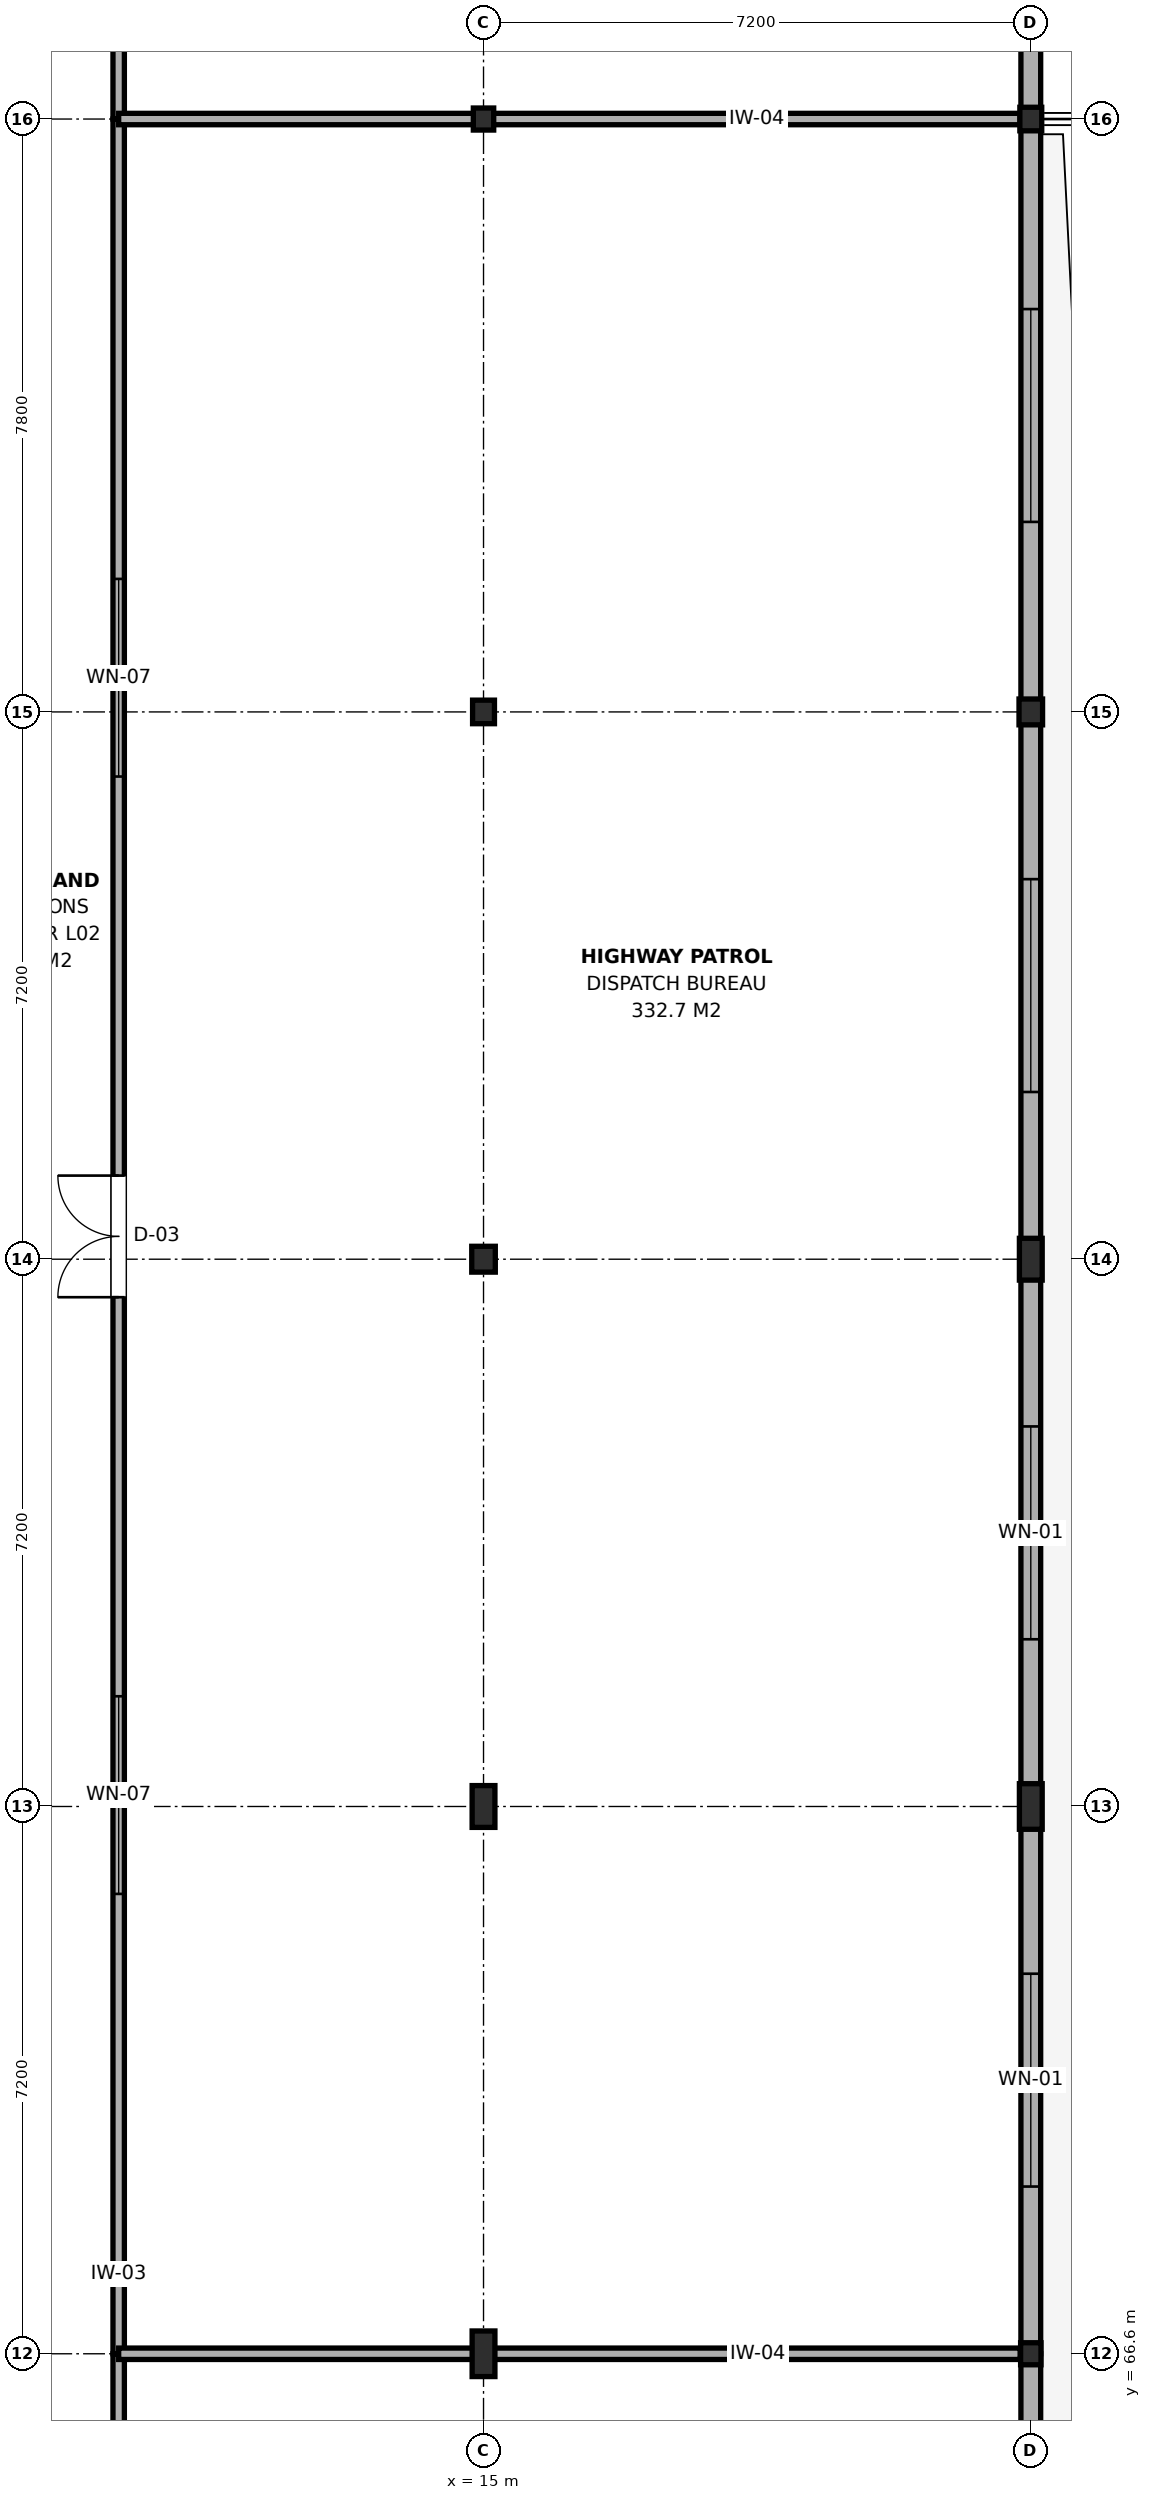
"""IFC4 building model, lengths in metres.
Left out: names, types, materials, properties, quantities, classifications, styles, units other than length and angle.
Written with IfcOpenShell. Run it as: python <this file> out.ifc"""

import sys

from ifc_helpers import new_model, si_unit, direction, frame, frame_2d, origin, origin_2d, place, context, subcontext, project, spatial, rectangle, i_section, extrude, element, fill, save


model = new_model("IFC4")
c1 = context("Model", 3, precision=1e-05, world=origin(), true_north=direction((0.0, 1.0)))
c2 = subcontext(c1, "Body", "Model", "MODEL_VIEW")
j1 = project(units=[si_unit("LENGTHUNIT", "METRE"), si_unit("PLANEANGLEUNIT", "RADIAN")], contexts=[c1])
p1 = place(None, origin())
s1 = spatial("IfcSite", under=j1, at=p1, CompositionType="ELEMENT")
p2 = place(p1, origin())
s2 = spatial("IfcBuilding", under=s1, at=p2, CompositionType="ELEMENT")
p3 = place(p2, frame((0.0, 0.0, 9.0)))
s3 = spatial("IfcBuildingStorey", under=s2, at=p3, CompositionType="ELEMENT", Elevation=9.0)
p4 = place(p3, frame((15.0, 66.6, 0.0), z_axis=(0.0, 0.0, 1.0), x_axis=(1.0, 0.0, 0.0)))
e1 = element("IfcColumn", 1, at=p4, inside=s3, PredefinedType="COLUMN", context=c2, shape_type="SweptSolid", body=[
    extrude(i_section(OverallWidth=0.3, OverallDepth=0.6, WebThickness=0.015, FlangeThickness=0.03, FilletRadius=0.027, at=origin_2d()), origin(), (0.0, 0.0, 1.0), 4.2),
])
p5 = place(p3, frame((15.0, 73.8, 0.0), z_axis=(0.0, 0.0, 1.0), x_axis=(1.0, 0.0, 0.0)))
e2 = element("IfcColumn", 2, at=p5, inside=s3, PredefinedType="COLUMN", context=c2, shape_type="SweptSolid", body=[
    extrude(i_section(OverallWidth=0.3, OverallDepth=0.55, WebThickness=0.015, FlangeThickness=0.029, FilletRadius=0.027, at=origin_2d()), origin(), (0.0, 0.0, 1.0), 4.2),
])
p6 = place(p3, frame((15.0, 81.0, 0.0), z_axis=(0.0, 0.0, 1.0), x_axis=(1.0, 0.0, 0.0)))
e3 = element("IfcColumn", 3, at=p6, inside=s3, PredefinedType="COLUMN", context=c2, shape_type="SweptSolid", body=[
    extrude(i_section(OverallWidth=0.31, OverallDepth=0.34, WebThickness=0.021, FlangeThickness=0.039, FilletRadius=0.027, at=origin_2d()), origin(), (0.0, 0.0, 1.0), 4.2),
])
p7 = place(p3, frame((15.0, 88.2, 0.0), z_axis=(0.0, 0.0, 1.0), x_axis=(1.0, 0.0, 0.0)))
e4 = element("IfcColumn", 4, at=p7, inside=s3, PredefinedType="COLUMN", context=c2, shape_type="SweptSolid", body=[
    extrude(i_section(OverallWidth=0.288, OverallDepth=0.31, WebThickness=0.019, FlangeThickness=0.033, FilletRadius=0.024, at=origin_2d()), origin(), (0.0, 0.0, 1.0), 4.2),
])
for number, where, z_axis, x_axis in (
    (5, (15.0, 96.0, 0.0), (0.0, 0.0, 1.0), (1.0, 0.0, 0.0)),
    (6, (22.2, 66.6, 0.0), (0.0, 0.0, 1.0), (1.0, 0.0, 0.0)),
):
    element("IfcColumn", number, at=place(p3, frame(where, z_axis=z_axis, x_axis=x_axis)), inside=s3, PredefinedType="COLUMN", context=c2, shape_type="SweptSolid", body=[
        extrude(i_section(OverallWidth=0.268, OverallDepth=0.29, WebThickness=0.018, FlangeThickness=0.032, FilletRadius=0.024, at=origin_2d()), origin(), (0.0, 0.0, 1.0), 4.2),
    ])
p8 = place(p3, frame((22.2, 73.8, 0.0), z_axis=(0.0, 0.0, 1.0), x_axis=(1.0, 0.0, 0.0)))
e7 = element("IfcColumn", 7, at=p8, inside=s3, PredefinedType="COLUMN", context=c2, shape_type="SweptSolid", body=[
    extrude(i_section(OverallWidth=0.3, OverallDepth=0.6, WebThickness=0.015, FlangeThickness=0.03, FilletRadius=0.027, at=origin_2d()), origin(), (0.0, 0.0, 1.0), 4.2),
])
p9 = place(p3, frame((22.2, 81.0, 0.0), z_axis=(0.0, 0.0, 1.0), x_axis=(1.0, 0.0, 0.0)))
e8 = element("IfcColumn", 8, at=p9, inside=s3, PredefinedType="COLUMN", context=c2, shape_type="SweptSolid", body=[
    extrude(i_section(OverallWidth=0.3, OverallDepth=0.55, WebThickness=0.015, FlangeThickness=0.029, FilletRadius=0.027, at=origin_2d()), origin(), (0.0, 0.0, 1.0), 4.2),
])
p10 = place(p3, frame((22.2, 88.2, 0.0), z_axis=(0.0, 0.0, 1.0), x_axis=(1.0, 0.0, 0.0)))
e9 = element("IfcColumn", 9, at=p10, inside=s3, PredefinedType="COLUMN", context=c2, shape_type="SweptSolid", body=[
    extrude(i_section(OverallWidth=0.31, OverallDepth=0.34, WebThickness=0.021, FlangeThickness=0.039, FilletRadius=0.027, at=origin_2d()), origin(), (0.0, 0.0, 1.0), 4.2),
])
p11 = place(p3, frame((22.2, 96.0, 0.0), z_axis=(0.0, 0.0, 1.0), x_axis=(1.0, 0.0, 0.0)))
e10 = element("IfcColumn", 10, at=p11, inside=s3, PredefinedType="COLUMN", context=c2, shape_type="SweptSolid", body=[
    extrude(i_section(OverallWidth=0.288, OverallDepth=0.31, WebThickness=0.019, FlangeThickness=0.033, FilletRadius=0.024, at=origin_2d()), origin(), (0.0, 0.0, 1.0), 4.2),
])
p12 = place(p3, frame((22.2, 58.8, 0.0), z_axis=(0.0, 0.0, 1.0), x_axis=(0.0, 1.0, 0.0)))
e11 = element("IfcWall", 11, at=p12, inside=s3, PredefinedType="SOLIDWALL", context=c2, shape_type="SweptSolid", body=[
    extrude(rectangle(XDim=7.8, YDim=0.26, at=frame_2d((3.9, 0.0))), origin(), (0.0, 0.0, 1.0), 3.525),
])
p13 = place(p12, frame((2.5, 0.0, 0.9)))
e12 = element("IfcOpeningElement", 12, at=p13, cuts=e11, PredefinedType="OPENING", context=c2, shape_type="SweptSolid", body=[
    extrude(rectangle(XDim=2.8, YDim=2.2, at=frame_2d((1.4, 1.1))), frame((0.0, 0.145, 0.0), z_axis=(0.0, -1.0, 0.0), x_axis=(1.0, 0.0, 0.0)), (0.0, 0.0, 1.0), 0.29),
])
p14 = place(p3, frame((22.2, 66.6, 0.0), z_axis=(0.0, 0.0, 1.0), x_axis=(0.0, 1.0, 0.0)))
e13 = element("IfcWall", 13, at=p14, inside=s3, PredefinedType="SOLIDWALL", context=c2, shape_type="SweptSolid", body=[
    extrude(rectangle(XDim=7.2, YDim=0.26, at=frame_2d((3.6, 0.0))), origin(), (0.0, 0.0, 1.0), 3.625),
])
p15 = place(p14, frame((2.2, 0.0, 0.9)))
e14 = element("IfcOpeningElement", 14, at=p15, cuts=e13, PredefinedType="OPENING", context=c2, shape_type="SweptSolid", body=[
    extrude(rectangle(XDim=2.8, YDim=2.2, at=frame_2d((1.4, 1.1))), frame((0.0, 0.145, 0.0), z_axis=(0.0, -1.0, 0.0), x_axis=(1.0, 0.0, 0.0)), (0.0, 0.0, 1.0), 0.29),
])
p16 = place(p3, frame((22.2, 73.8, 0.0), z_axis=(0.0, 0.0, 1.0), x_axis=(0.0, 1.0, 0.0)))
e15 = element("IfcWall", 15, at=p16, inside=s3, PredefinedType="SOLIDWALL", context=c2, shape_type="SweptSolid", body=[
    extrude(rectangle(XDim=7.2, YDim=0.26, at=frame_2d((3.6, 0.0))), origin(), (0.0, 0.0, 1.0), 3.375),
])
p17 = place(p16, frame((2.2, 0.0, 0.9)))
e16 = element("IfcOpeningElement", 16, at=p17, cuts=e15, PredefinedType="OPENING", context=c2, shape_type="SweptSolid", body=[
    extrude(rectangle(XDim=2.8, YDim=2.2, at=frame_2d((1.4, 1.1))), frame((0.0, 0.145, 0.0), z_axis=(0.0, -1.0, 0.0), x_axis=(1.0, 0.0, 0.0)), (0.0, 0.0, 1.0), 0.29),
])
p18 = place(p3, frame((22.2, 81.0, 0.0), z_axis=(0.0, 0.0, 1.0), x_axis=(0.0, 1.0, 0.0)))
e17 = element("IfcWall", 17, at=p18, inside=s3, PredefinedType="SOLIDWALL", context=c2, shape_type="SweptSolid", body=[
    extrude(rectangle(XDim=7.2, YDim=0.26, at=frame_2d((3.6, 0.0))), origin(), (0.0, 0.0, 1.0), 3.375),
])
p19 = place(p18, frame((2.2, 0.0, 0.9)))
e18 = element("IfcOpeningElement", 18, at=p19, cuts=e17, PredefinedType="OPENING", context=c2, shape_type="SweptSolid", body=[
    extrude(rectangle(XDim=2.8, YDim=2.2, at=frame_2d((1.4, 1.1))), frame((0.0, 0.145, 0.0), z_axis=(0.0, -1.0, 0.0), x_axis=(1.0, 0.0, 0.0)), (0.0, 0.0, 1.0), 0.29),
])
p20 = place(p3, frame((22.2, 88.2, 0.0), z_axis=(0.0, 0.0, 1.0), x_axis=(0.0, 1.0, 0.0)))
e19 = element("IfcWall", 19, at=p20, inside=s3, PredefinedType="SOLIDWALL", context=c2, shape_type="SweptSolid", body=[
    extrude(rectangle(XDim=7.8, YDim=0.26, at=frame_2d((3.9, 0.0))), origin(), (0.0, 0.0, 1.0), 3.425),
])
p21 = place(p20, frame((2.5, 0.0, 0.9)))
e20 = element("IfcOpeningElement", 20, at=p21, cuts=e19, PredefinedType="OPENING", context=c2, shape_type="SweptSolid", body=[
    extrude(rectangle(XDim=2.8, YDim=2.2, at=frame_2d((1.4, 1.1))), frame((0.0, 0.145, 0.0), z_axis=(0.0, -1.0, 0.0), x_axis=(1.0, 0.0, 0.0)), (0.0, 0.0, 1.0), 0.29),
])
p22 = place(p3, frame((22.2, 96.0, 0.0), z_axis=(0.0, 0.0, 1.0), x_axis=(0.0, 1.0, 0.0)))
e21 = element("IfcWall", 21, at=p22, inside=s3, PredefinedType="SOLIDWALL", context=c2, shape_type="SweptSolid", body=[
    extrude(rectangle(XDim=8.4, YDim=0.26, at=frame_2d((4.2, 0.0))), origin(), (0.0, 0.0, 1.0), 3.385),
])
p23 = place(p22, frame((3.3, 0.0, 0.0)))
e22 = element("IfcOpeningElement", 22, at=p23, cuts=e21, PredefinedType="OPENING", context=c2, shape_type="SweptSolid", body=[
    extrude(rectangle(XDim=1.8, YDim=2.2, at=frame_2d((0.9, 1.1))), frame((0.0, 0.145, 0.0), z_axis=(0.0, -1.0, 0.0), x_axis=(1.0, 0.0, 0.0)), (0.0, 0.0, 1.0), 0.29),
])
p24 = place(p3, frame((10.2, 42.0, 0.0), z_axis=(0.0, 0.0, 1.0), x_axis=(0.0, 1.0, 0.0)))
e23 = element("IfcWall", 23, at=p24, inside=s3, PredefinedType="PARTITIONING", context=c2, shape_type="SweptSolid", body=[
    extrude(rectangle(XDim=24.6, YDim=0.15, at=frame_2d((12.3, 0.0))), origin(), (0.0, 0.0, 1.0), 3.375),
])
p25 = place(p24, frame((11.775, 0.0, 0.0)))
e24 = element("IfcOpeningElement", 24, at=p25, cuts=e23, PredefinedType="OPENING", context=c2, shape_type="SweptSolid", body=[
    extrude(rectangle(XDim=1.05, YDim=2.15, at=frame_2d((0.525, 1.075))), frame((0.0, 0.09, 0.0), z_axis=(0.0, -1.0, 0.0), x_axis=(1.0, 0.0, 0.0)), (0.0, 0.0, 1.0), 0.18),
])
p26 = place(p24, frame((4.85, 0.0, 0.95)))
e25 = element("IfcOpeningElement", 25, at=p26, cuts=e23, PredefinedType="OPENING", context=c2, shape_type="SweptSolid", body=[
    extrude(rectangle(XDim=2.6, YDim=1.5, at=frame_2d((1.3, 0.75))), frame((0.0, 0.09, 0.0), z_axis=(0.0, -1.0, 0.0), x_axis=(1.0, 0.0, 0.0)), (0.0, 0.0, 1.0), 0.18),
])
p27 = place(p24, frame((17.15, 0.0, 0.95)))
e26 = element("IfcOpeningElement", 26, at=p27, cuts=e23, PredefinedType="OPENING", context=c2, shape_type="SweptSolid", body=[
    extrude(rectangle(XDim=2.6, YDim=1.5, at=frame_2d((1.3, 0.75))), frame((0.0, 0.09, 0.0), z_axis=(0.0, -1.0, 0.0), x_axis=(1.0, 0.0, 0.0)), (0.0, 0.0, 1.0), 0.18),
])
p28 = place(p3, frame((10.2, 66.6, 0.0), z_axis=(0.0, 0.0, 1.0), x_axis=(0.0, 1.0, 0.0)))
e27 = element("IfcWall", 27, at=p28, inside=s3, PredefinedType="PARTITIONING", context=c2, shape_type="SweptSolid", body=[
    extrude(rectangle(XDim=29.4, YDim=0.15, at=frame_2d((14.7, 0.0))), origin(), (0.0, 0.0, 1.0), 3.475),
])
p29 = place(p28, frame((13.9, 0.0, 0.0)))
e28 = element("IfcOpeningElement", 28, at=p29, cuts=e27, PredefinedType="OPENING", context=c2, shape_type="SweptSolid", body=[
    extrude(rectangle(XDim=1.6, YDim=2.15, at=frame_2d((0.8, 1.075))), frame((0.0, 0.09, 0.0), z_axis=(0.0, -1.0, 0.0), x_axis=(1.0, 0.0, 0.0)), (0.0, 0.0, 1.0), 0.18),
])
p30 = place(p28, frame((6.05, 0.0, 0.95)))
e29 = element("IfcOpeningElement", 29, at=p30, cuts=e27, PredefinedType="OPENING", context=c2, shape_type="SweptSolid", body=[
    extrude(rectangle(XDim=2.6, YDim=1.5, at=frame_2d((1.3, 0.75))), frame((0.0, 0.09, 0.0), z_axis=(0.0, -1.0, 0.0), x_axis=(1.0, 0.0, 0.0)), (0.0, 0.0, 1.0), 0.18),
])
p31 = place(p28, frame((20.75, 0.0, 0.95)))
e30 = element("IfcOpeningElement", 30, at=p31, cuts=e27, PredefinedType="OPENING", context=c2, shape_type="SweptSolid", body=[
    extrude(rectangle(XDim=2.6, YDim=1.5, at=frame_2d((1.3, 0.75))), frame((0.0, 0.09, 0.0), z_axis=(0.0, -1.0, 0.0), x_axis=(1.0, 0.0, 0.0)), (0.0, 0.0, 1.0), 0.18),
])
p32 = place(p3, frame((10.2, 66.6, 0.0), z_axis=(0.0, 0.0, 1.0), x_axis=(1.0, 0.0, 0.0)))
e31 = element("IfcWall", 31, at=p32, inside=s3, PredefinedType="PARTITIONING", context=c2, shape_type="SweptSolid", body=[
    extrude(rectangle(XDim=11.86, YDim=0.15, at=frame_2d((5.93, 0.0))), origin(), (0.0, 0.0, 1.0), 3.475),
])
p33 = place(p3, frame((10.2, 96.0, 0.0), z_axis=(0.0, 0.0, 1.0), x_axis=(0.0, 1.0, 0.0)))
e32 = element("IfcWall", 32, at=p33, inside=s3, PredefinedType="PARTITIONING", context=c2, shape_type="SweptSolid", body=[
    extrude(rectangle(XDim=8.4, YDim=0.15, at=frame_2d((4.2, 0.0))), origin(), (0.0, 0.0, 1.0), 3.475),
])
p34 = place(p33, frame((3.45, 0.0, 0.0)))
e33 = element("IfcOpeningElement", 33, at=p34, cuts=e32, PredefinedType="OPENING", context=c2, shape_type="SweptSolid", body=[
    extrude(rectangle(XDim=1.5, YDim=2.15, at=frame_2d((0.75, 1.075))), frame((0.0, 0.09, 0.0), z_axis=(0.0, -1.0, 0.0), x_axis=(1.0, 0.0, 0.0)), (0.0, 0.0, 1.0), 0.18),
])
p35 = place(p3, frame((10.2, 96.0, 0.0), z_axis=(0.0, 0.0, 1.0), x_axis=(1.0, 0.0, 0.0)))
e34 = element("IfcWall", 34, at=p35, inside=s3, PredefinedType="PARTITIONING", context=c2, shape_type="SweptSolid", body=[
    extrude(rectangle(XDim=11.86, YDim=0.15, at=frame_2d((5.93, 0.0))), origin(), (0.0, 0.0, 1.0), 3.435),
])
p36 = place(p15, origin())
e35 = element("IfcWindow", 35, at=p36, inside=s3, PartitioningType="SINGLE_PANEL", PredefinedType="WINDOW", context=c2, shape_type="SweptSolid", body=[
    extrude(rectangle(XDim=2.8, YDim=2.2, at=frame_2d((1.4, 1.1))), frame((0.0, 0.03, 0.0), z_axis=(0.0, -1.0, 0.0), x_axis=(1.0, 0.0, 0.0)), (0.0, 0.0, 1.0), 0.06),
])
fill(e14, e35)
p37 = place(p17, origin())
e36 = element("IfcWindow", 36, at=p37, inside=s3, PartitioningType="SINGLE_PANEL", PredefinedType="WINDOW", context=c2, shape_type="SweptSolid", body=[
    extrude(rectangle(XDim=2.8, YDim=2.2, at=frame_2d((1.4, 1.1))), frame((0.0, 0.03, 0.0), z_axis=(0.0, -1.0, 0.0), x_axis=(1.0, 0.0, 0.0)), (0.0, 0.0, 1.0), 0.06),
])
fill(e16, e36)
p38 = place(p19, origin())
e37 = element("IfcWindow", 37, at=p38, inside=s3, PartitioningType="SINGLE_PANEL", PredefinedType="WINDOW", context=c2, shape_type="SweptSolid", body=[
    extrude(rectangle(XDim=2.8, YDim=2.2, at=frame_2d((1.4, 1.1))), frame((0.0, 0.03, 0.0), z_axis=(0.0, -1.0, 0.0), x_axis=(1.0, 0.0, 0.0)), (0.0, 0.0, 1.0), 0.06),
])
fill(e18, e37)
p39 = place(p21, origin())
e38 = element("IfcWindow", 38, at=p39, inside=s3, PartitioningType="SINGLE_PANEL", PredefinedType="WINDOW", context=c2, shape_type="SweptSolid", body=[
    extrude(rectangle(XDim=2.8, YDim=2.2, at=frame_2d((1.4, 1.1))), frame((0.0, 0.03, 0.0), z_axis=(0.0, -1.0, 0.0), x_axis=(1.0, 0.0, 0.0)), (0.0, 0.0, 1.0), 0.06),
])
fill(e20, e38)
p40 = place(p29, origin())
e39 = element("IfcDoor", 39, at=p40, inside=s3, OperationType="DOUBLE_DOOR_SINGLE_SWING", PredefinedType="DOOR", context=c2, shape_type="SweptSolid", body=[
    extrude(rectangle(XDim=1.6, YDim=2.15, at=frame_2d((0.8, 1.075))), frame((0.0, 0.025, 0.0), z_axis=(0.0, -1.0, 0.0), x_axis=(1.0, 0.0, 0.0)), (0.0, 0.0, 1.0), 0.05),
])
fill(e28, e39)
p41 = place(p30, origin())
e40 = element("IfcWindow", 40, at=p41, inside=s3, PartitioningType="SINGLE_PANEL", PredefinedType="WINDOW", context=c2, shape_type="SweptSolid", body=[
    extrude(rectangle(XDim=2.6, YDim=1.5, at=frame_2d((1.3, 0.75))), frame((0.0, 0.03, 0.0), z_axis=(0.0, -1.0, 0.0), x_axis=(1.0, 0.0, 0.0)), (0.0, 0.0, 1.0), 0.06),
])
fill(e29, e40)
p42 = place(p31, origin())
e41 = element("IfcWindow", 41, at=p42, inside=s3, PartitioningType="SINGLE_PANEL", PredefinedType="WINDOW", context=c2, shape_type="SweptSolid", body=[
    extrude(rectangle(XDim=2.6, YDim=1.5, at=frame_2d((1.3, 0.75))), frame((0.0, 0.03, 0.0), z_axis=(0.0, -1.0, 0.0), x_axis=(1.0, 0.0, 0.0)), (0.0, 0.0, 1.0), 0.06),
])
fill(e30, e41)
save(model, sys.argv[1])
